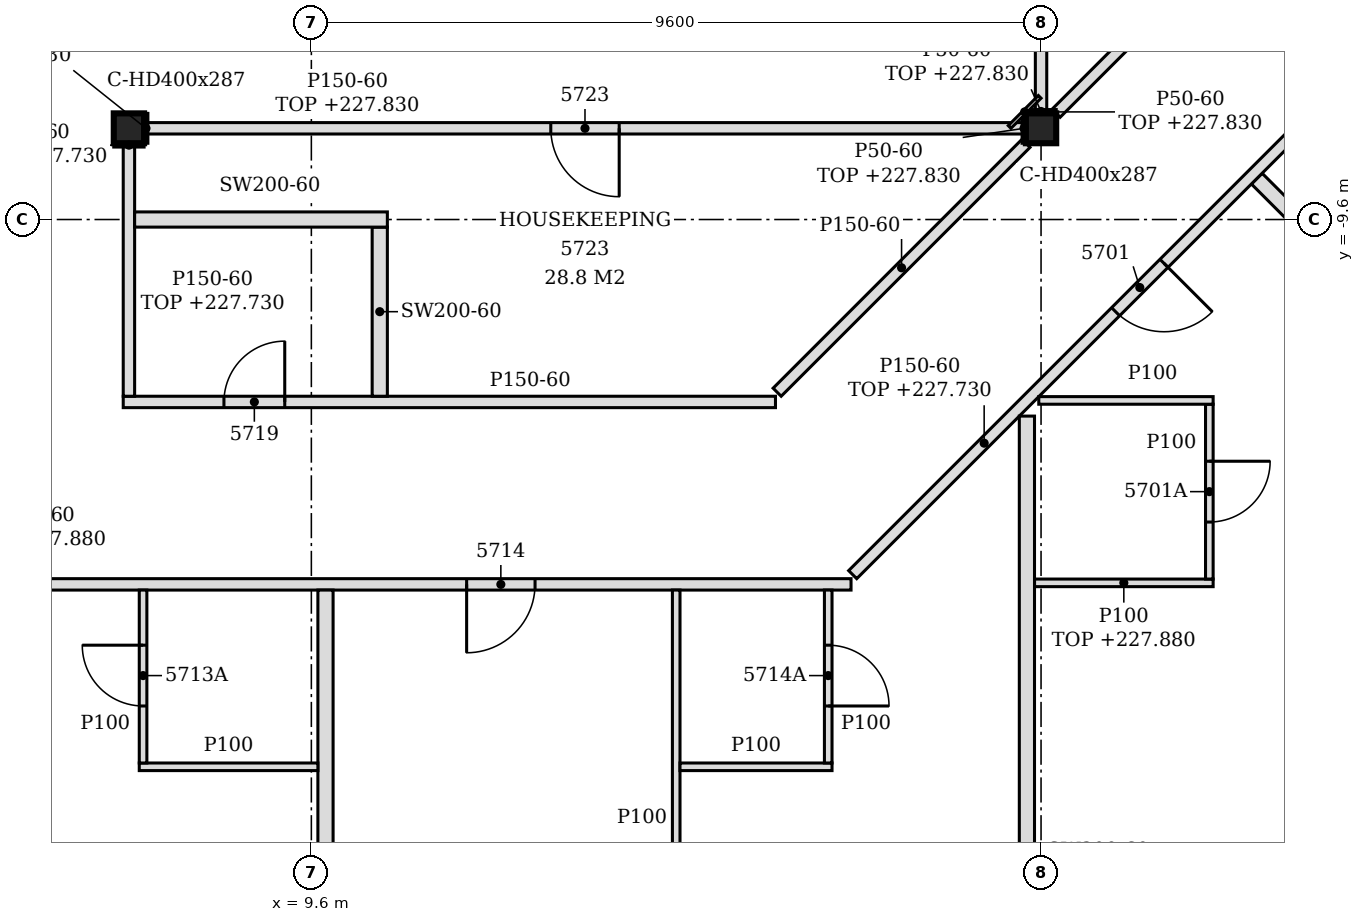
"""IFC4 building model, lengths in metres.
Left out: names, types, materials, properties, quantities, classifications, styles, units other than length and angle.
Written with IfcOpenShell. Run it as: python <this file> out.ifc"""

import sys

from ifc_helpers import new_model, si_unit, direction, frame, frame_2d, origin, origin_2d, place, context, subcontext, project, spatial, polyline, rectangle, i_section, outline, extrude, element, fill, save


model = new_model("IFC4")
c1 = context("Model", 3, precision=1e-05, world=origin(), true_north=direction((0.0, 1.0)))
c2 = subcontext(c1, "Body", "Model", "MODEL_VIEW")
j1 = project(units=[si_unit("LENGTHUNIT", "METRE"), si_unit("PLANEANGLEUNIT", "RADIAN")], contexts=[c1])
p1 = place(None, origin())
s1 = spatial("IfcSite", under=j1, at=p1, CompositionType="ELEMENT")
p2 = place(p1, origin())
s2 = spatial("IfcBuilding", under=s1, at=p2, CompositionType="ELEMENT")
p3 = place(p2, frame((0.0, 0.0, 225.0)))
s3 = spatial("IfcBuildingStorey", under=s2, at=p3, CompositionType="ELEMENT", Elevation=225.0)
for number, where, z_axis, x_axis in (
    (1, (7.2, -8.4, -0.15), (0.0, 0.0, 1.0), (1.0, 0.0, 0.0)),
    (2, (19.2, -8.4, -0.15), (0.0, 0.0, 1.0), (1.0, 0.0, 0.0)),
):
    element("IfcColumn", number, at=place(p3, frame(where, z_axis=z_axis, x_axis=x_axis)), inside=s3, PredefinedType="COLUMN", context=c2, shape_type="SweptSolid", body=[
        extrude(i_section(OverallWidth=0.399, OverallDepth=0.393, WebThickness=0.023, FlangeThickness=0.037, FilletRadius=0.015, at=origin_2d()), origin(), (0.0, 0.0, 1.0), 3.6),
    ])
p4 = place(p3, frame((9.786, -23.62, 0.0), z_axis=(0.0, 0.0, 1.0), x_axis=(0.0, 1.0, 0.0)))
e3 = element("IfcWall", 3, at=p4, inside=s3, PredefinedType="PARTITIONING", context=c2, shape_type="SweptSolid", body=[
    extrude(outline(polyline([(0.0, 0.0), (9.145, 0.0), (9.145, 2.88), (9.115, 2.88), (9.113, 3.45), (4.525, 3.45), (4.523, 2.88), (4.315, 2.88), (4.313, 3.45), (0.67, 3.45), (0.668, 2.93), (0.37, 2.93), (0.368, 3.45), (0.0, 3.45), (0.0, 0.0)])), frame((0.0, 0.1, 0.0), z_axis=(0.0, -1.0, 0.0), x_axis=(1.0, 0.0, 0.0)), (0.0, 0.0, 1.0), 0.2),
])
p5 = place(p3, frame((19.014, -23.62, 0.0), z_axis=(0.0, 0.0, 1.0), x_axis=(0.0, 1.0, 0.0)))
e4 = element("IfcWall", 4, at=p5, inside=s3, PredefinedType="PARTITIONING", context=c2, shape_type="SweptSolid", body=[
    extrude(outline(polyline([(0.0, 0.0), (11.434, 0.0), (11.434, 2.73), (0.64, 2.73), (0.638, 2.93), (0.37, 2.93), (0.368, 3.45), (0.0, 3.45), (0.0, 0.0)])), frame((0.0, 0.1, 0.0), z_axis=(0.0, -1.0, 0.0), x_axis=(1.0, 0.0, 0.0)), (0.0, 0.0, 1.0), 0.2),
])
p6 = place(p3, frame((14.4, -22.877, 0.0), z_axis=(0.0, 0.0, 1.0), x_axis=(0.0, 1.0, 0.0)))
e5 = element("IfcWall", 5, at=p6, inside=s3, PredefinedType="PARTITIONING", context=c2, shape_type="SweptSolid", body=[
    extrude(outline(polyline([(0.0, 0.0), (8.402, 0.0), (8.402, 2.88), (8.372, 2.88), (8.37, 3.45), (3.782, 3.45), (3.78, 2.88), (3.572, 2.88), (3.57, 3.45), (0.0, 3.45), (0.0, 0.0)])), frame((0.0, 0.05, 0.0), z_axis=(0.0, -1.0, 0.0), x_axis=(1.0, 0.0, 0.0)), (0.0, 0.0, 1.0), 0.1),
])
p7 = place(p6, frame((2.027, 0.0, 0.0)))
e6 = element("IfcOpeningElement", 6, at=p7, cuts=e5, PredefinedType="OPENING", context=c2, shape_type="SweptSolid", body=[
    extrude(rectangle(XDim=0.9, YDim=2.1, at=frame_2d((0.45, 1.05))), frame((0.0, 0.06, 0.0), z_axis=(0.0, -1.0, 0.0), x_axis=(1.0, 0.0, 0.0)), (0.0, 0.0, 1.0), 0.12),
])
p8 = place(p3, frame((7.336, -16.8, 0.0), z_axis=(0.0, 0.0, 1.0), x_axis=(1.0, 0.0, 0.0)))
e7 = element("IfcWall", 7, at=p8, inside=s3, PredefinedType="PARTITIONING", context=c2, shape_type="SweptSolid", body=[
    extrude(outline(polyline([(0.0, 0.0), (2.35, 0.0), (2.35, 3.45), (0.014, 3.45), (0.012, 2.73), (0.0, 2.73), (0.0, 0.0)])), frame((0.0, 0.05, 0.0), z_axis=(0.0, -1.0, 0.0), x_axis=(1.0, 0.0, 0.0)), (0.0, 0.0, 1.0), 0.1),
])
p9 = place(p3, frame((7.386, -16.75, 0.0), z_axis=(0.0, 0.0, 1.0), x_axis=(0.0, 1.0, 0.0)))
e8 = element("IfcWall", 8, at=p9, inside=s3, PredefinedType="PARTITIONING", context=c2, shape_type="SweptSolid", body=[
    extrude(outline(polyline([(0.0, 0.0), (2.275, 0.0), (2.275, 2.88), (2.245, 2.88), (2.243, 3.45), (0.0, 3.45), (0.0, 0.0)])), frame((0.0, 0.05, 0.0), z_axis=(0.0, -1.0, 0.0), x_axis=(1.0, 0.0, 0.0)), (0.0, 0.0, 1.0), 0.1),
])
p10 = place(p9, frame((0.75, 0.0, 0.0)))
e9 = element("IfcOpeningElement", 9, at=p10, cuts=e8, PredefinedType="OPENING", context=c2, shape_type="SweptSolid", body=[
    extrude(rectangle(XDim=0.8, YDim=2.1, at=frame_2d((0.4, 1.05))), frame((0.0, 0.06, 0.0), z_axis=(0.0, -1.0, 0.0), x_axis=(1.0, 0.0, 0.0)), (0.0, 0.0, 1.0), 0.12),
])
p11 = place(p3, frame((14.45, -16.8, 0.0), z_axis=(0.0, 0.0, 1.0), x_axis=(1.0, 0.0, 0.0)))
e10 = element("IfcWall", 10, at=p11, inside=s3, PredefinedType="PARTITIONING", context=c2, shape_type="SweptSolid", body=[
    extrude(rectangle(XDim=2.0, YDim=0.1, at=frame_2d((1.0, 0.0))), origin(), (0.0, 0.0, 1.0), 3.45),
])
p12 = place(p3, frame((16.4, -16.75, 0.0), z_axis=(0.0, 0.0, 1.0), x_axis=(0.0, 1.0, 0.0)))
e11 = element("IfcWall", 11, at=p12, inside=s3, PredefinedType="PARTITIONING", context=c2, shape_type="SweptSolid", body=[
    extrude(outline(polyline([(0.0, 0.0), (2.275, 0.0), (2.275, 2.88), (2.245, 2.88), (2.243, 3.45), (0.0, 3.45), (0.0, 0.0)])), frame((0.0, 0.05, 0.0), z_axis=(0.0, -1.0, 0.0), x_axis=(1.0, 0.0, 0.0)), (0.0, 0.0, 1.0), 0.1),
])
p13 = place(p12, frame((0.75, 0.0, 0.0)))
e12 = element("IfcOpeningElement", 12, at=p13, cuts=e11, PredefinedType="OPENING", context=c2, shape_type="SweptSolid", body=[
    extrude(rectangle(XDim=0.8, YDim=2.1, at=frame_2d((0.4, 1.05))), frame((0.0, 0.06, 0.0), z_axis=(0.0, -1.0, 0.0), x_axis=(1.0, 0.0, 0.0)), (0.0, 0.0, 1.0), 0.12),
])
p14 = place(p3, frame((29.636, -16.66, 0.0), z_axis=(0.0, 0.0, 1.0), x_axis=(-0.707095420673, 0.707118141518, 0.0)))
e13 = element("IfcWall", 13, at=p14, inside=s3, PredefinedType="PARTITIONING", context=c2, shape_type="SweptSolid", body=[
    extrude(rectangle(XDim=10.745, YDim=0.2, at=frame_2d((5.373, 0.0))), origin(), (0.0, 0.0, 1.0), 2.88),
])
p15 = place(p3, frame((-4.326, -14.4, 0.0), z_axis=(0.0, 0.0, 1.0), x_axis=(1.0, 0.0, 0.0)))
e14 = element("IfcWall", 14, at=p15, inside=s3, PredefinedType="PARTITIONING", context=c2, shape_type="SweptSolid", body=[
    extrude(outline(polyline([(0.0, 0.0), (21.026, 0.0), (21.026, 2.88), (11.676, 2.88), (11.674, 2.73), (11.376, 2.73), (11.374, 2.88), (1.369, 2.88), (1.367, 2.63), (0.229, 2.63), (0.227, 2.88), (0.0, 2.88), (0.0, 0.0)])), frame((0.0, 0.075, 0.0), z_axis=(0.0, -1.0, 0.0), x_axis=(1.0, 0.0, 0.0)), (0.0, 0.0, 1.0), 0.15),
])
p16 = place(p15, frame((5.169, 0.0, 0.0)))
e15 = element("IfcOpeningElement", 15, at=p16, cuts=e14, PredefinedType="OPENING", context=c2, shape_type="SweptSolid", body=[
    extrude(rectangle(XDim=0.9, YDim=2.1, at=frame_2d((0.45, 1.05))), frame((0.0, 0.085, 0.0), z_axis=(0.0, -1.0, 0.0), x_axis=(1.0, 0.0, 0.0)), (0.0, 0.0, 1.0), 0.17),
])
p17 = place(p15, frame((15.969, 0.0, 0.0)))
e16 = element("IfcOpeningElement", 16, at=p17, cuts=e14, PredefinedType="OPENING", context=c2, shape_type="SweptSolid", body=[
    extrude(rectangle(XDim=0.9, YDim=2.1, at=frame_2d((0.45, 1.05))), frame((0.0, 0.085, 0.0), z_axis=(0.0, -1.0, 0.0), x_axis=(1.0, 0.0, 0.0)), (0.0, 0.0, 1.0), 0.17),
])
p18 = place(p3, frame((19.114, -14.38, 0.0), z_axis=(0.0, 0.0, 1.0), x_axis=(1.0, 0.0, 0.0)))
e17 = element("IfcWall", 17, at=p18, inside=s3, PredefinedType="PARTITIONING", context=c2, shape_type="SweptSolid", body=[
    extrude(outline(polyline([(0.0, 0.0), (2.35, 0.0), (2.35, 2.88), (0.236, 2.88), (0.234, 2.73), (0.0, 2.73), (0.0, 0.0)])), frame((0.0, 0.05, 0.0), z_axis=(0.0, -1.0, 0.0), x_axis=(1.0, 0.0, 0.0)), (0.0, 0.0, 1.0), 0.1),
])
p19 = place(p3, frame((16.722, -14.272, 0.0), z_axis=(0.0, 0.0, 1.0), x_axis=(0.707106781187, 0.707106781187, 0.0)))
e18 = element("IfcWall", 18, at=p19, inside=s3, PredefinedType="PARTITIONING", context=c2, shape_type="SweptSolid", body=[
    extrude(rectangle(XDim=20.049, YDim=0.15, at=frame_2d((10.025, 0.0))), origin(), (0.0, 0.0, 1.0), 2.73),
])
p20 = place(p19, frame((4.892, 0.0, 0.0)))
e19 = element("IfcOpeningElement", 19, at=p20, cuts=e18, PredefinedType="OPENING", context=c2, shape_type="SweptSolid", body=[
    extrude(rectangle(XDim=0.9, YDim=2.1, at=frame_2d((0.45, 1.05))), frame((0.0, 0.085, 0.0), z_axis=(0.0, -1.0, 0.0), x_axis=(1.0, 0.0, 0.0)), (0.0, 0.0, 1.0), 0.17),
])
p21 = place(p19, frame((10.042, 0.0, 0.0)))
e20 = element("IfcOpeningElement", 20, at=p21, cuts=e18, PredefinedType="OPENING", context=c2, shape_type="SweptSolid", body=[
    extrude(rectangle(XDim=0.9, YDim=2.1, at=frame_2d((0.45, 1.05))), frame((0.0, 0.085, 0.0), z_axis=(0.0, -1.0, 0.0), x_axis=(1.0, 0.0, 0.0)), (0.0, 0.0, 1.0), 0.17),
])
p22 = place(p19, frame((14.443, 0.0, 0.0)))
e21 = element("IfcOpeningElement", 21, at=p22, cuts=e18, PredefinedType="OPENING", context=c2, shape_type="SweptSolid", body=[
    extrude(rectangle(XDim=0.9, YDim=2.1, at=frame_2d((0.45, 1.05))), frame((0.0, 0.085, 0.0), z_axis=(0.0, -1.0, 0.0), x_axis=(1.0, 0.0, 0.0)), (0.0, 0.0, 1.0), 0.17),
])
p23 = place(p19, frame((17.837, 0.0, 0.0)))
e22 = element("IfcOpeningElement", 22, at=p23, cuts=e18, PredefinedType="OPENING", context=c2, shape_type="SweptSolid", body=[
    extrude(rectangle(XDim=0.9, YDim=2.1, at=frame_2d((0.45, 1.05))), frame((0.0, 0.085, 0.0), z_axis=(0.0, -1.0, 0.0), x_axis=(1.0, 0.0, 0.0)), (0.0, 0.0, 1.0), 0.17),
])
p24 = place(p3, frame((21.414, -14.33, 0.0), z_axis=(0.0, 0.0, 1.0), x_axis=(0.0, 1.0, 0.0)))
e23 = element("IfcWall", 23, at=p24, inside=s3, PredefinedType="PARTITIONING", context=c2, shape_type="SweptSolid", body=[
    extrude(outline(polyline([(0.0, 0.0), (2.3, 0.0), (2.3, 3.45), (0.035, 3.45), (0.033, 2.88), (0.0, 2.88), (0.0, 0.0)])), frame((0.0, 0.05, 0.0), z_axis=(0.0, -1.0, 0.0), x_axis=(1.0, 0.0, 0.0)), (0.0, 0.0, 1.0), 0.1),
])
p25 = place(p24, frame((0.75, 0.0, 0.0)))
e24 = element("IfcOpeningElement", 24, at=p25, cuts=e23, PredefinedType="OPENING", context=c2, shape_type="SweptSolid", body=[
    extrude(rectangle(XDim=0.8, YDim=2.1, at=frame_2d((0.4, 1.05))), frame((0.0, 0.06, 0.0), z_axis=(0.0, -1.0, 0.0), x_axis=(1.0, 0.0, 0.0)), (0.0, 0.0, 1.0), 0.12),
])
p26 = place(p3, frame((7.125, -12.0, 0.0), z_axis=(0.0, 0.0, 1.0), x_axis=(1.0, 0.0, 0.0)))
e25 = element("IfcWall", 25, at=p26, inside=s3, PredefinedType="PARTITIONING", context=c2, shape_type="SweptSolid", body=[
    extrude(outline(polyline([(0.0, 0.0), (8.581, 0.0), (8.581, 3.45), (0.225, 3.45), (0.223, 2.73), (0.0, 2.73), (0.0, 0.0)])), frame((0.0, 0.075, 0.0), z_axis=(0.0, -1.0, 0.0), x_axis=(1.0, 0.0, 0.0)), (0.0, 0.0, 1.0), 0.15),
])
p27 = place(p26, frame((1.325, 0.0, 0.0)))
e26 = element("IfcOpeningElement", 26, at=p27, cuts=e25, PredefinedType="OPENING", context=c2, shape_type="SweptSolid", body=[
    extrude(rectangle(XDim=0.8, YDim=2.1, at=frame_2d((0.4, 1.05))), frame((0.0, 0.085, 0.0), z_axis=(0.0, -1.0, 0.0), x_axis=(1.0, 0.0, 0.0)), (0.0, 0.0, 1.0), 0.17),
])
p28 = place(p3, frame((19.17, -11.98, 0.0), z_axis=(0.0, 0.0, 1.0), x_axis=(1.0, 0.0, 0.0)))
e27 = element("IfcWall", 27, at=p28, inside=s3, PredefinedType="PARTITIONING", context=c2, shape_type="SweptSolid", body=[
    extrude(outline(polyline([(0.0, 0.0), (2.294, 0.0), (2.294, 3.45), (0.18, 3.45), (0.178, 2.73), (0.0, 2.73), (0.0, 0.0)])), frame((0.0, 0.05, 0.0), z_axis=(0.0, -1.0, 0.0), x_axis=(1.0, 0.0, 0.0)), (0.0, 0.0, 1.0), 0.1),
])
p29 = place(p3, frame((7.2, -11.925, 0.0), z_axis=(0.0, 0.0, 1.0), x_axis=(0.0, 1.0, 0.0)))
e28 = element("IfcWall", 28, at=p29, inside=s3, PredefinedType="PARTITIONING", context=c2, shape_type="SweptSolid", body=[
    extrude(rectangle(XDim=3.329, YDim=0.15, at=frame_2d((1.664, 0.0))), origin(), (0.0, 0.0, 1.0), 2.73),
])
p30 = place(p3, frame((10.5, -11.925, 0.0), z_axis=(0.0, 0.0, 1.0), x_axis=(0.0, 1.0, 0.0)))
e29 = element("IfcWall", 29, at=p30, inside=s3, PredefinedType="PARTITIONING", context=c2, shape_type="SweptSolid", body=[
    extrude(rectangle(XDim=2.225, YDim=0.2, at=frame_2d((1.113, 0.0))), origin(), (0.0, 0.0, 1.0), 3.45),
])
p31 = place(p3, frame((15.728, -11.872, 0.0), z_axis=(0.0, 0.0, 1.0), x_axis=(0.707080416772, 0.707133144618, 0.0)))
e30 = element("IfcWall", 30, at=p31, inside=s3, PredefinedType="PARTITIONING", context=c2, shape_type="SweptSolid", body=[
    extrude(rectangle(XDim=4.63, YDim=0.15, at=frame_2d((2.315, 0.0))), origin(), (0.0, 0.0, 1.0), 3.45),
])
p32 = place(p3, frame((7.275, -9.6, 0.0), z_axis=(0.0, 0.0, 1.0), x_axis=(1.0, 0.0, 0.0)))
e31 = element("IfcWall", 31, at=p32, inside=s3, PredefinedType="PARTITIONING", context=c2, shape_type="SweptSolid", body=[
    extrude(outline(polyline([(0.0, 0.0), (3.325, 0.0), (3.325, 3.45), (0.075, 3.45), (0.073, 2.73), (0.0, 2.73), (0.0, 0.0)])), frame((0.0, 0.1, 0.0), z_axis=(0.0, -1.0, 0.0), x_axis=(1.0, 0.0, 0.0)), (0.0, 0.0, 1.0), 0.2),
])
p33 = place(p3, frame((7.399, -8.4, 0.0), z_axis=(0.0, 0.0, 1.0), x_axis=(1.0, 0.0, 0.0)))
e32 = element("IfcWall", 32, at=p33, inside=s3, PredefinedType="PARTITIONING", context=c2, shape_type="SweptSolid", body=[
    extrude(rectangle(XDim=11.601, YDim=0.15, at=frame_2d((5.801, 0.0))), origin(), (0.0, 0.0, 1.0), 2.83),
])
p34 = place(p33, frame((5.351, 0.0, 0.0)))
e33 = element("IfcOpeningElement", 33, at=p34, cuts=e32, PredefinedType="OPENING", context=c2, shape_type="SweptSolid", body=[
    extrude(rectangle(XDim=0.9, YDim=2.1, at=frame_2d((0.45, 1.05))), frame((0.0, 0.085, 0.0), z_axis=(0.0, -1.0, 0.0), x_axis=(1.0, 0.0, 0.0)), (0.0, 0.0, 1.0), 0.17),
])
p35 = place(p3, frame((19.2, -8.204, 0.0), z_axis=(0.0, 0.0, 1.0), x_axis=(0.0, 1.0, 0.0)))
e34 = element("IfcWall", 34, at=p35, inside=s3, PredefinedType="PARTITIONING", context=c2, shape_type="SweptSolid", body=[
    extrude(rectangle(XDim=9.329, YDim=0.15, at=frame_2d((4.664, 0.0))), origin(), (0.0, 0.0, 1.0), 2.83),
])
p36 = place(p35, frame((7.354, 0.0, 0.0)))
e35 = element("IfcOpeningElement", 35, at=p36, cuts=e34, PredefinedType="OPENING", context=c2, shape_type="SweptSolid", body=[
    extrude(rectangle(XDim=0.8, YDim=2.1, at=frame_2d((0.4, 1.05))), frame((0.0, 0.085, 0.0), z_axis=(0.0, -1.0, 0.0), x_axis=(1.0, 0.0, 0.0)), (0.0, 0.0, 1.0), 0.17),
])
p37 = place(p35, frame((4.503, 0.0, 0.0)))
e36 = element("IfcOpeningElement", 36, at=p37, cuts=e34, PredefinedType="OPENING", context=c2, shape_type="SweptSolid", body=[
    extrude(rectangle(XDim=0.8, YDim=2.1, at=frame_2d((0.4, 1.05))), frame((0.0, 0.085, 0.0), z_axis=(0.0, -1.0, 0.0), x_axis=(1.0, 0.0, 0.0)), (0.0, 0.0, 1.0), 0.17),
])
p38 = place(p3, frame((19.398, -8.202, 0.0), z_axis=(0.0, 0.0, 1.0), x_axis=(0.707116088468, 0.707097473782, 0.0)))
e37 = element("IfcWall", 37, at=p38, inside=s3, PredefinedType="PARTITIONING", context=c2, shape_type="SweptSolid", body=[
    extrude(rectangle(XDim=13.115, YDim=0.15, at=frame_2d((6.558, 0.0))), origin(), (0.0, 0.0, 1.0), 2.88),
])
p39 = place(p38, frame((6.058, 0.0, 0.0)))
e38 = element("IfcOpeningElement", 38, at=p39, cuts=e37, PredefinedType="OPENING", context=c2, shape_type="SweptSolid", body=[
    extrude(rectangle(XDim=0.9, YDim=2.1, at=frame_2d((0.45, 1.05))), frame((0.0, 0.085, 0.0), z_axis=(0.0, -1.0, 0.0), x_axis=(1.0, 0.0, 0.0)), (0.0, 0.0, 1.0), 0.17),
])
p40 = place(p3, frame((7.425, -8.596, 0.0), z_axis=(0.0, 0.0, 1.0), x_axis=(0.0, 1.0, 0.0)))
e39 = element("IfcWall", 39, at=p40, inside=s3, PredefinedType="PARTITIONING", context=c2, shape_type="SweptSolid", body=[
    extrude(rectangle(XDim=0.393, YDim=0.05, at=frame_2d((0.196, 0.0))), origin(), (0.0, 0.0, 1.0), 2.83),
])
p41 = place(p3, frame((18.786, -8.382, 0.0), z_axis=(0.0, 0.0, 1.0), x_axis=(0.707106781187, 0.707106781187, 0.0)))
e40 = element("IfcWall", 40, at=p41, inside=s3, PredefinedType="PARTITIONING", context=c2, shape_type="SweptSolid", body=[
    extrude(rectangle(XDim=0.56, YDim=0.05, at=frame_2d((0.28, 0.0))), origin(), (0.0, 0.0, 1.0), 2.83),
])
p42 = place(p3, frame((7.0, -8.622, 0.0), z_axis=(0.0, 0.0, 1.0), x_axis=(1.0, 0.0, 0.0)))
e41 = element("IfcWall", 41, at=p42, inside=s3, PredefinedType="PARTITIONING", context=c2, shape_type="SweptSolid", body=[
    extrude(rectangle(XDim=0.399, YDim=0.05, at=frame_2d((0.199, 0.0))), origin(), (0.0, 0.0, 1.0), 2.73),
])
p43 = place(p3, frame((19.0, -8.178, 0.0), z_axis=(0.0, 0.0, 1.0), x_axis=(1.0, 0.0, 0.0)))
e42 = element("IfcWall", 42, at=p43, inside=s3, PredefinedType="PARTITIONING", context=c2, shape_type="SweptSolid", body=[
    extrude(rectangle(XDim=0.399, YDim=0.05, at=frame_2d((0.199, 0.0))), origin(), (0.0, 0.0, 1.0), 2.83),
])
p44 = place(p3, frame((18.976, -8.596, 0.0), z_axis=(0.0, 0.0, 1.0), x_axis=(0.0, 1.0, 0.0)))
e43 = element("IfcWall", 43, at=p44, inside=s3, PredefinedType="PARTITIONING", context=c2, shape_type="SweptSolid", body=[
    extrude(rectangle(XDim=0.393, YDim=0.05, at=frame_2d((0.196, 0.0))), origin(), (0.0, 0.0, 1.0), 2.83),
])
p45 = place(p20, frame((0.9, 0.0, 0.0), z_axis=(0.0, 0.0, 1.0), x_axis=(-1.0, 0.0, 0.0)))
e44 = element("IfcDoor", 44, at=p45, inside=s3, OperationType="SINGLE_SWING_LEFT", PredefinedType="DOOR", context=c2, shape_type="SweptSolid", body=[
    extrude(rectangle(XDim=0.9, YDim=2.1, at=frame_2d((0.45, 1.05))), frame((0.0, 0.025, 0.0), z_axis=(0.0, -1.0, 0.0), x_axis=(1.0, 0.0, 0.0)), (0.0, 0.0, 1.0), 0.05),
])
fill(e19, e44)
p46 = place(p25, frame((0.8, 0.0, 0.0), z_axis=(0.0, 0.0, 1.0), x_axis=(-1.0, 0.0, 0.0)))
e45 = element("IfcDoor", 45, at=p46, inside=s3, OperationType="SINGLE_SWING_LEFT", PredefinedType="DOOR", context=c2, shape_type="SweptSolid", body=[
    extrude(rectangle(XDim=0.8, YDim=2.1, at=frame_2d((0.4, 1.05))), frame((0.0, 0.025, 0.0), z_axis=(0.0, -1.0, 0.0), x_axis=(1.0, 0.0, 0.0)), (0.0, 0.0, 1.0), 0.05),
])
fill(e24, e45)
p47 = place(p10, origin())
e46 = element("IfcDoor", 46, at=p47, inside=s3, OperationType="SINGLE_SWING_RIGHT", PredefinedType="DOOR", context=c2, shape_type="SweptSolid", body=[
    extrude(rectangle(XDim=0.8, YDim=2.1, at=frame_2d((0.4, 1.05))), frame((0.0, 0.025, 0.0), z_axis=(0.0, -1.0, 0.0), x_axis=(1.0, 0.0, 0.0)), (0.0, 0.0, 1.0), 0.05),
])
fill(e9, e46)
p48 = place(p17, frame((0.9, 0.0, 0.0), z_axis=(0.0, 0.0, 1.0), x_axis=(-1.0, 0.0, 0.0)))
e47 = element("IfcDoor", 47, at=p48, inside=s3, OperationType="SINGLE_SWING_RIGHT", PredefinedType="DOOR", context=c2, shape_type="SweptSolid", body=[
    extrude(rectangle(XDim=0.9, YDim=2.1, at=frame_2d((0.45, 1.05))), frame((0.0, 0.025, 0.0), z_axis=(0.0, -1.0, 0.0), x_axis=(1.0, 0.0, 0.0)), (0.0, 0.0, 1.0), 0.05),
])
fill(e16, e47)
p49 = place(p13, frame((0.8, 0.0, 0.0), z_axis=(0.0, 0.0, 1.0), x_axis=(-1.0, 0.0, 0.0)))
e48 = element("IfcDoor", 48, at=p49, inside=s3, OperationType="SINGLE_SWING_RIGHT", PredefinedType="DOOR", context=c2, shape_type="SweptSolid", body=[
    extrude(rectangle(XDim=0.8, YDim=2.1, at=frame_2d((0.4, 1.05))), frame((0.0, 0.025, 0.0), z_axis=(0.0, -1.0, 0.0), x_axis=(1.0, 0.0, 0.0)), (0.0, 0.0, 1.0), 0.05),
])
fill(e12, e48)
p50 = place(p27, origin())
e49 = element("IfcDoor", 49, at=p50, inside=s3, OperationType="SINGLE_SWING_RIGHT", PredefinedType="DOOR", context=c2, shape_type="SweptSolid", body=[
    extrude(rectangle(XDim=0.8, YDim=2.1, at=frame_2d((0.4, 1.05))), frame((0.0, 0.025, 0.0), z_axis=(0.0, -1.0, 0.0), x_axis=(1.0, 0.0, 0.0)), (0.0, 0.0, 1.0), 0.05),
])
fill(e26, e49)
p51 = place(p34, frame((0.9, 0.0, 0.0), z_axis=(0.0, 0.0, 1.0), x_axis=(-1.0, 0.0, 0.0)))
e50 = element("IfcDoor", 50, at=p51, inside=s3, OperationType="SINGLE_SWING_LEFT", PredefinedType="DOOR", context=c2, shape_type="SweptSolid", body=[
    extrude(rectangle(XDim=0.9, YDim=2.1, at=frame_2d((0.45, 1.05))), frame((0.0, 0.025, 0.0), z_axis=(0.0, -1.0, 0.0), x_axis=(1.0, 0.0, 0.0)), (0.0, 0.0, 1.0), 0.05),
])
fill(e33, e50)
save(model, sys.argv[1])
